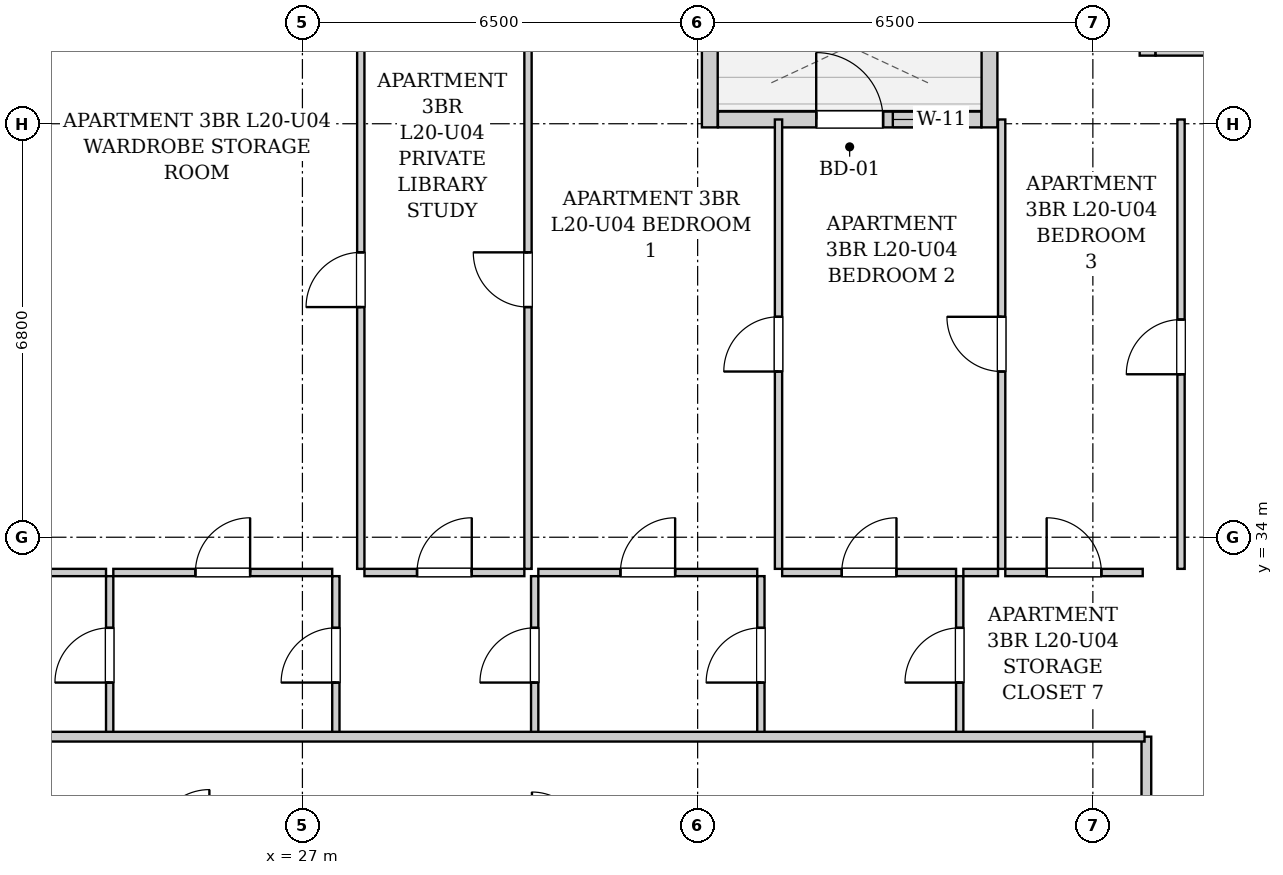
"""IFC4 building model, lengths in metres.
Left out: names, types, materials, properties, quantities, classifications, styles, units other than length and angle.
Written with IfcOpenShell. Run it as: python <this file> out.ifc"""

import sys

from ifc_helpers import new_model, si_unit, direction, frame, frame_2d, origin, place, context, subcontext, project, spatial, rectangle, extrude, element, fill, save


model = new_model("IFC4")
c1 = context("Model", 3, precision=1e-05, world=origin(), true_north=direction((0.0, 1.0)))
c2 = subcontext(c1, "Body", "Model", "MODEL_VIEW")
j1 = project(units=[si_unit("LENGTHUNIT", "METRE"), si_unit("PLANEANGLEUNIT", "RADIAN")], contexts=[c1])
p1 = place(None, origin())
s1 = spatial("IfcSite", under=j1, at=p1, CompositionType="ELEMENT")
p2 = place(p1, origin())
s2 = spatial("IfcBuilding", under=s1, at=p2, CompositionType="ELEMENT")
p3 = place(p2, frame((0.0, 0.0, 75.1)))
s3 = spatial("IfcBuildingStorey", under=s2, at=p3, CompositionType="ELEMENT", Elevation=75.1)
p4 = place(p3, frame((33.7, 43.14, 0.0), z_axis=(0.0, 0.0, 1.0), x_axis=(0.0, -1.0, 0.0)))
e1 = element("IfcWall", 1, at=p4, inside=s3, PredefinedType="SOLIDWALL", context=c2, shape_type="SweptSolid", body=[
    extrude(rectangle(XDim=2.4, YDim=0.26, at=frame_2d((1.2, 0.0))), origin(), (0.0, 0.0, 1.0), 2.94),
])
p5 = place(p3, frame((33.834, 40.87, 0.0), z_axis=(0.0, 0.0, 1.0), x_axis=(1.0, 0.0, 0.0)))
e2 = element("IfcWall", 2, at=p5, inside=s3, PredefinedType="SOLIDWALL", context=c2, shape_type="SweptSolid", body=[
    extrude(rectangle(XDim=4.332, YDim=0.26, at=frame_2d((2.166, 0.0))), origin(), (0.0, 0.0, 1.0), 2.94),
])
p6 = place(p5, frame((1.616, 0.0, 0.0)))
e3 = element("IfcOpeningElement", 3, at=p6, cuts=e2, PredefinedType="OPENING", context=c2, shape_type="SweptSolid", body=[
    extrude(rectangle(XDim=1.1, YDim=2.0, at=frame_2d((0.55, 1.0))), frame((0.0, 0.14, 0.0), z_axis=(0.0, -1.0, 0.0), x_axis=(1.0, 0.0, 0.0)), (0.0, 0.0, 1.0), 0.28),
])
p7 = place(p5, frame((2.876, 0.0, 0.55)))
e4 = element("IfcOpeningElement", 4, at=p7, cuts=e2, PredefinedType="OPENING", context=c2, shape_type="SweptSolid", body=[
    extrude(rectangle(XDim=0.85, YDim=1.2, at=frame_2d((0.425, 0.6))), frame((0.0, 0.14, 0.0), z_axis=(0.0, -1.0, 0.0), x_axis=(1.0, 0.0, 0.0)), (0.0, 0.0, 1.0), 0.28),
])
p8 = place(p3, frame((38.3, 40.74, 0.0), z_axis=(0.0, 0.0, 1.0), x_axis=(0.0, 1.0, 0.0)))
e5 = element("IfcWall", 5, at=p8, inside=s3, PredefinedType="SOLIDWALL", context=c2, shape_type="SweptSolid", body=[
    extrude(rectangle(XDim=2.4, YDim=0.26, at=frame_2d((1.2, 0.0))), origin(), (0.0, 0.0, 1.0), 2.94),
])
p9 = place(p3, frame((40.9, 42.998, 0.0), z_axis=(0.0, 0.0, 1.0), x_axis=(0.0, -1.0, 0.0)))
e6 = element("IfcWall", 6, at=p9, inside=s3, PredefinedType="SOLIDWALL", context=c2, shape_type="SweptSolid", body=[
    extrude(rectangle(XDim=1.078, YDim=0.26, at=frame_2d((0.539, 0.0))), origin(), (0.0, 0.0, 1.0), 2.94),
])
p10 = place(p3, frame((41.032, 42.05, 0.0), z_axis=(0.0, 0.0, 1.0), x_axis=(1.0, 0.0, 0.0)))
e7 = element("IfcWall", 7, at=p10, inside=s3, PredefinedType="SOLIDWALL", context=c2, shape_type="SweptSolid", body=[
    extrude(rectangle(XDim=1.248, YDim=0.26, at=frame_2d((0.624, 0.0))), origin(), (0.0, 0.0, 1.0), 2.94),
])
p11 = place(p3, frame((40.88, 28.98, 0.0), z_axis=(0.0, 0.0, 1.0), x_axis=(0.0, 1.0, 0.0)))
e8 = element("IfcWall", 8, at=p11, inside=s3, PredefinedType="PARTITIONING", context=c2, shape_type="SweptSolid", body=[
    extrude(rectangle(XDim=1.74, YDim=0.16, at=frame_2d((0.87, 0.0))), origin(), (0.0, 0.0, 1.0), 2.94),
])
p12 = place(p3, frame((23.83, 30.76, 0.0), z_axis=(0.0, 0.0, 1.0), x_axis=(0.0, 1.0, 0.0)))
e9 = element("IfcWall", 9, at=p12, inside=s3, PredefinedType="PARTITIONING", context=c2, shape_type="SweptSolid", body=[
    extrude(rectangle(XDim=2.6, YDim=0.12, at=frame_2d((1.3, 0.0))), origin(), (0.0, 0.0, 1.0), 2.94),
])
p13 = place(p12, frame((0.85, 0.0, 0.0)))
e10 = element("IfcOpeningElement", 10, at=p13, cuts=e9, PredefinedType="OPENING", context=c2, shape_type="SweptSolid", body=[
    extrude(rectangle(XDim=0.9, YDim=2.05, at=frame_2d((0.45, 1.025))), frame((0.0, 0.07, 0.0), z_axis=(0.0, -1.0, 0.0), x_axis=(1.0, 0.0, 0.0)), (0.0, 0.0, 1.0), 0.14),
])
p14 = place(p3, frame((22.7, 33.42, 0.0), z_axis=(0.0, 0.0, 1.0), x_axis=(1.0, 0.0, 0.0)))
e11 = element("IfcWall", 11, at=p14, inside=s3, PredefinedType="PARTITIONING", context=c2, shape_type="SweptSolid", body=[
    extrude(rectangle(XDim=1.07, YDim=0.12, at=frame_2d((0.535, 0.0))), origin(), (0.0, 0.0, 1.0), 2.94),
])
p15 = place(p3, frame((27.55, 30.76, 0.0), z_axis=(0.0, 0.0, 1.0), x_axis=(0.0, 1.0, 0.0)))
e12 = element("IfcWall", 12, at=p15, inside=s3, PredefinedType="PARTITIONING", context=c2, shape_type="SweptSolid", body=[
    extrude(rectangle(XDim=2.6, YDim=0.12, at=frame_2d((1.3, 0.0))), origin(), (0.0, 0.0, 1.0), 2.94),
])
p16 = place(p15, frame((0.85, 0.0, 0.0)))
e13 = element("IfcOpeningElement", 13, at=p16, cuts=e12, PredefinedType="OPENING", context=c2, shape_type="SweptSolid", body=[
    extrude(rectangle(XDim=0.9, YDim=2.05, at=frame_2d((0.45, 1.025))), frame((0.0, 0.07, 0.0), z_axis=(0.0, -1.0, 0.0), x_axis=(1.0, 0.0, 0.0)), (0.0, 0.0, 1.0), 0.14),
])
p17 = place(p3, frame((23.89, 33.42, 0.0), z_axis=(0.0, 0.0, 1.0), x_axis=(1.0, 0.0, 0.0)))
e14 = element("IfcWall", 14, at=p17, inside=s3, PredefinedType="PARTITIONING", context=c2, shape_type="SweptSolid", body=[
    extrude(rectangle(XDim=3.6, YDim=0.12, at=frame_2d((1.8, 0.0))), origin(), (0.0, 0.0, 1.0), 2.94),
])
p18 = place(p17, frame((1.35, 0.0, 0.0)))
e15 = element("IfcOpeningElement", 15, at=p18, cuts=e14, PredefinedType="OPENING", context=c2, shape_type="SweptSolid", body=[
    extrude(rectangle(XDim=0.9, YDim=2.05, at=frame_2d((0.45, 1.025))), frame((0.0, 0.07, 0.0), z_axis=(0.0, -1.0, 0.0), x_axis=(1.0, 0.0, 0.0)), (0.0, 0.0, 1.0), 0.14),
])
p19 = place(p3, frame((30.82, 30.76, 0.0), z_axis=(0.0, 0.0, 1.0), x_axis=(0.0, 1.0, 0.0)))
e16 = element("IfcWall", 16, at=p19, inside=s3, PredefinedType="PARTITIONING", context=c2, shape_type="SweptSolid", body=[
    extrude(rectangle(XDim=2.6, YDim=0.12, at=frame_2d((1.3, 0.0))), origin(), (0.0, 0.0, 1.0), 2.94),
])
p20 = place(p19, frame((0.85, 0.0, 0.0)))
e17 = element("IfcOpeningElement", 17, at=p20, cuts=e16, PredefinedType="OPENING", context=c2, shape_type="SweptSolid", body=[
    extrude(rectangle(XDim=0.9, YDim=2.05, at=frame_2d((0.45, 1.025))), frame((0.0, 0.07, 0.0), z_axis=(0.0, -1.0, 0.0), x_axis=(1.0, 0.0, 0.0)), (0.0, 0.0, 1.0), 0.14),
])
p21 = place(p3, frame((28.02, 33.42, 0.0), z_axis=(0.0, 0.0, 1.0), x_axis=(1.0, 0.0, 0.0)))
e18 = element("IfcWall", 18, at=p21, inside=s3, PredefinedType="PARTITIONING", context=c2, shape_type="SweptSolid", body=[
    extrude(rectangle(XDim=2.63, YDim=0.12, at=frame_2d((1.315, 0.0))), origin(), (0.0, 0.0, 1.0), 2.94),
])
p22 = place(p21, frame((0.865, 0.0, 0.0)))
e19 = element("IfcOpeningElement", 19, at=p22, cuts=e18, PredefinedType="OPENING", context=c2, shape_type="SweptSolid", body=[
    extrude(rectangle(XDim=0.9, YDim=2.05, at=frame_2d((0.45, 1.025))), frame((0.0, 0.07, 0.0), z_axis=(0.0, -1.0, 0.0), x_axis=(1.0, 0.0, 0.0)), (0.0, 0.0, 1.0), 0.14),
])
p23 = place(p3, frame((34.54, 30.76, 0.0), z_axis=(0.0, 0.0, 1.0), x_axis=(0.0, 1.0, 0.0)))
e20 = element("IfcWall", 20, at=p23, inside=s3, PredefinedType="PARTITIONING", context=c2, shape_type="SweptSolid", body=[
    extrude(rectangle(XDim=2.6, YDim=0.12, at=frame_2d((1.3, 0.0))), origin(), (0.0, 0.0, 1.0), 2.94),
])
p24 = place(p23, frame((0.85, 0.0, 0.0)))
e21 = element("IfcOpeningElement", 21, at=p24, cuts=e20, PredefinedType="OPENING", context=c2, shape_type="SweptSolid", body=[
    extrude(rectangle(XDim=0.9, YDim=2.05, at=frame_2d((0.45, 1.025))), frame((0.0, 0.07, 0.0), z_axis=(0.0, -1.0, 0.0), x_axis=(1.0, 0.0, 0.0)), (0.0, 0.0, 1.0), 0.14),
])
p25 = place(p3, frame((30.88, 33.42, 0.0), z_axis=(0.0, 0.0, 1.0), x_axis=(1.0, 0.0, 0.0)))
e22 = element("IfcWall", 22, at=p25, inside=s3, PredefinedType="PARTITIONING", context=c2, shape_type="SweptSolid", body=[
    extrude(rectangle(XDim=3.6, YDim=0.12, at=frame_2d((1.8, 0.0))), origin(), (0.0, 0.0, 1.0), 2.94),
])
p26 = place(p25, frame((1.35, 0.0, 0.0)))
e23 = element("IfcOpeningElement", 23, at=p26, cuts=e22, PredefinedType="OPENING", context=c2, shape_type="SweptSolid", body=[
    extrude(rectangle(XDim=0.9, YDim=2.05, at=frame_2d((0.45, 1.025))), frame((0.0, 0.07, 0.0), z_axis=(0.0, -1.0, 0.0), x_axis=(1.0, 0.0, 0.0)), (0.0, 0.0, 1.0), 0.14),
])
p27 = place(p3, frame((37.81, 30.76, 0.0), z_axis=(0.0, 0.0, 1.0), x_axis=(0.0, 1.0, 0.0)))
e24 = element("IfcWall", 24, at=p27, inside=s3, PredefinedType="PARTITIONING", context=c2, shape_type="SweptSolid", body=[
    extrude(rectangle(XDim=2.6, YDim=0.12, at=frame_2d((1.3, 0.0))), origin(), (0.0, 0.0, 1.0), 2.94),
])
p28 = place(p27, frame((0.85, 0.0, 0.0)))
e25 = element("IfcOpeningElement", 25, at=p28, cuts=e24, PredefinedType="OPENING", context=c2, shape_type="SweptSolid", body=[
    extrude(rectangle(XDim=0.9, YDim=2.05, at=frame_2d((0.45, 1.025))), frame((0.0, 0.07, 0.0), z_axis=(0.0, -1.0, 0.0), x_axis=(1.0, 0.0, 0.0)), (0.0, 0.0, 1.0), 0.14),
])
p29 = place(p3, frame((34.89, 33.42, 0.0), z_axis=(0.0, 0.0, 1.0), x_axis=(1.0, 0.0, 0.0)))
e26 = element("IfcWall", 26, at=p29, inside=s3, PredefinedType="PARTITIONING", context=c2, shape_type="SweptSolid", body=[
    extrude(rectangle(XDim=2.86, YDim=0.12, at=frame_2d((1.43, 0.0))), origin(), (0.0, 0.0, 1.0), 2.94),
])
p30 = place(p29, frame((0.98, 0.0, 0.0)))
e27 = element("IfcOpeningElement", 27, at=p30, cuts=e26, PredefinedType="OPENING", context=c2, shape_type="SweptSolid", body=[
    extrude(rectangle(XDim=0.9, YDim=2.05, at=frame_2d((0.45, 1.025))), frame((0.0, 0.07, 0.0), z_axis=(0.0, -1.0, 0.0), x_axis=(1.0, 0.0, 0.0)), (0.0, 0.0, 1.0), 0.14),
])
p31 = place(p3, frame((37.87, 33.42, 0.0), z_axis=(0.0, 0.0, 1.0), x_axis=(1.0, 0.0, 0.0)))
e28 = element("IfcWall", 28, at=p31, inside=s3, PredefinedType="PARTITIONING", context=c2, shape_type="SweptSolid", body=[
    extrude(rectangle(XDim=0.57, YDim=0.12, at=frame_2d((0.285, 0.0))), origin(), (0.0, 0.0, 1.0), 2.94),
])
p32 = place(p3, frame((38.56, 33.42, 0.0), z_axis=(0.0, 0.0, 1.0), x_axis=(1.0, 0.0, 0.0)))
e29 = element("IfcWall", 29, at=p32, inside=s3, PredefinedType="PARTITIONING", context=c2, shape_type="SweptSolid", body=[
    extrude(rectangle(XDim=2.26, YDim=0.12, at=frame_2d((1.13, 0.0))), origin(), (0.0, 0.0, 1.0), 2.94),
])
p33 = place(p32, frame((0.68, 0.0, 0.0)))
e30 = element("IfcOpeningElement", 30, at=p33, cuts=e29, PredefinedType="OPENING", context=c2, shape_type="SweptSolid", body=[
    extrude(rectangle(XDim=0.9, YDim=2.05, at=frame_2d((0.45, 1.025))), frame((0.0, 0.07, 0.0), z_axis=(0.0, -1.0, 0.0), x_axis=(1.0, 0.0, 0.0)), (0.0, 0.0, 1.0), 0.14),
])
p34 = place(p3, frame((27.96, 33.48, 0.0), z_axis=(0.0, 0.0, 1.0), x_axis=(0.0, 1.0, 0.0)))
e31 = element("IfcWall", 31, at=p34, inside=s3, PredefinedType="PARTITIONING", context=c2, shape_type="SweptSolid", body=[
    extrude(rectangle(XDim=9.54, YDim=0.12, at=frame_2d((4.77, 0.0))), origin(), (0.0, 0.0, 1.0), 2.94),
])
p35 = place(p34, frame((4.305, 0.0, 0.0)))
e32 = element("IfcOpeningElement", 32, at=p35, cuts=e31, PredefinedType="OPENING", context=c2, shape_type="SweptSolid", body=[
    extrude(rectangle(XDim=0.9, YDim=2.05, at=frame_2d((0.45, 1.025))), frame((0.0, 0.07, 0.0), z_axis=(0.0, -1.0, 0.0), x_axis=(1.0, 0.0, 0.0)), (0.0, 0.0, 1.0), 0.14),
])
p36 = place(p3, frame((30.71, 33.48, 0.0), z_axis=(0.0, 0.0, 1.0), x_axis=(0.0, 1.0, 0.0)))
e33 = element("IfcWall", 33, at=p36, inside=s3, PredefinedType="PARTITIONING", context=c2, shape_type="SweptSolid", body=[
    extrude(rectangle(XDim=9.54, YDim=0.12, at=frame_2d((4.77, 0.0))), origin(), (0.0, 0.0, 1.0), 2.94),
])
p37 = place(p36, frame((4.305, 0.0, 0.0)))
e34 = element("IfcOpeningElement", 34, at=p37, cuts=e33, PredefinedType="OPENING", context=c2, shape_type="SweptSolid", body=[
    extrude(rectangle(XDim=0.9, YDim=2.05, at=frame_2d((0.45, 1.025))), frame((0.0, 0.07, 0.0), z_axis=(0.0, -1.0, 0.0), x_axis=(1.0, 0.0, 0.0)), (0.0, 0.0, 1.0), 0.14),
])
p38 = place(p3, frame((34.83, 33.48, 0.0), z_axis=(0.0, 0.0, 1.0), x_axis=(0.0, 1.0, 0.0)))
e35 = element("IfcWall", 35, at=p38, inside=s3, PredefinedType="PARTITIONING", context=c2, shape_type="SweptSolid", body=[
    extrude(rectangle(XDim=7.39, YDim=0.12, at=frame_2d((3.695, 0.0))), origin(), (0.0, 0.0, 1.0), 2.94),
])
p39 = place(p38, frame((3.245, 0.0, 0.0)))
e36 = element("IfcOpeningElement", 36, at=p39, cuts=e35, PredefinedType="OPENING", context=c2, shape_type="SweptSolid", body=[
    extrude(rectangle(XDim=0.9, YDim=2.05, at=frame_2d((0.45, 1.025))), frame((0.0, 0.07, 0.0), z_axis=(0.0, -1.0, 0.0), x_axis=(1.0, 0.0, 0.0)), (0.0, 0.0, 1.0), 0.14),
])
p40 = place(p3, frame((38.5, 33.48, 0.0), z_axis=(0.0, 0.0, 1.0), x_axis=(0.0, 1.0, 0.0)))
e37 = element("IfcWall", 37, at=p40, inside=s3, PredefinedType="PARTITIONING", context=c2, shape_type="SweptSolid", body=[
    extrude(rectangle(XDim=7.39, YDim=0.12, at=frame_2d((3.695, 0.0))), origin(), (0.0, 0.0, 1.0), 2.94),
])
p41 = place(p40, frame((3.245, 0.0, 0.0)))
e38 = element("IfcOpeningElement", 38, at=p41, cuts=e37, PredefinedType="OPENING", context=c2, shape_type="SweptSolid", body=[
    extrude(rectangle(XDim=0.9, YDim=2.05, at=frame_2d((0.45, 1.025))), frame((0.0, 0.07, 0.0), z_axis=(0.0, -1.0, 0.0), x_axis=(1.0, 0.0, 0.0)), (0.0, 0.0, 1.0), 0.14),
])
p42 = place(p3, frame((41.45, 33.48, 0.0), z_axis=(0.0, 0.0, 1.0), x_axis=(0.0, 1.0, 0.0)))
e39 = element("IfcWall", 39, at=p42, inside=s3, PredefinedType="PARTITIONING", context=c2, shape_type="SweptSolid", body=[
    extrude(rectangle(XDim=7.39, YDim=0.12, at=frame_2d((3.695, 0.0))), origin(), (0.0, 0.0, 1.0), 2.94),
])
p43 = place(p42, frame((3.2, 0.0, 0.0)))
e40 = element("IfcOpeningElement", 40, at=p43, cuts=e39, PredefinedType="OPENING", context=c2, shape_type="SweptSolid", body=[
    extrude(rectangle(XDim=0.9, YDim=2.05, at=frame_2d((0.45, 1.025))), frame((0.0, 0.07, 0.0), z_axis=(0.0, -1.0, 0.0), x_axis=(1.0, 0.0, 0.0)), (0.0, 0.0, 1.0), 0.14),
])
p44 = place(p3, frame((10.05, 30.72, 0.0), z_axis=(0.0, 0.0, 1.0), x_axis=(1.0, 0.0, 0.0)))
e41 = element("IfcWall", 41, at=p44, inside=s3, PredefinedType="PARTITIONING", context=c2, shape_type="SweptSolid", body=[
    extrude(rectangle(XDim=30.8, YDim=0.16, at=frame_2d((15.4, 0.0))), origin(), (0.0, 0.0, 1.0), 2.94),
])
p45 = place(p44, frame((4.165, 0.0, 0.0)))
e42 = element("IfcOpeningElement", 42, at=p45, cuts=e41, PredefinedType="OPENING", context=c2, shape_type="SweptSolid", body=[
    extrude(rectangle(XDim=0.95, YDim=2.1, at=frame_2d((0.475, 1.05))), frame((0.0, 0.09, 0.0), z_axis=(0.0, -1.0, 0.0), x_axis=(1.0, 0.0, 0.0)), (0.0, 0.0, 1.0), 0.18),
])
p46 = place(p13, origin())
e43 = element("IfcDoor", 43, at=p46, inside=s3, OperationType="SINGLE_SWING_LEFT", PredefinedType="DOOR", context=c2, shape_type="SweptSolid", body=[
    extrude(rectangle(XDim=0.9, YDim=2.05, at=frame_2d((0.45, 1.025))), frame((0.0, 0.025, 0.0), z_axis=(0.0, -1.0, 0.0), x_axis=(1.0, 0.0, 0.0)), (0.0, 0.0, 1.0), 0.05),
])
fill(e10, e43)
p47 = place(p16, origin())
e44 = element("IfcDoor", 44, at=p47, inside=s3, OperationType="SINGLE_SWING_LEFT", PredefinedType="DOOR", context=c2, shape_type="SweptSolid", body=[
    extrude(rectangle(XDim=0.9, YDim=2.05, at=frame_2d((0.45, 1.025))), frame((0.0, 0.025, 0.0), z_axis=(0.0, -1.0, 0.0), x_axis=(1.0, 0.0, 0.0)), (0.0, 0.0, 1.0), 0.05),
])
fill(e13, e44)
p48 = place(p18, origin())
e45 = element("IfcDoor", 45, at=p48, inside=s3, OperationType="SINGLE_SWING_RIGHT", PredefinedType="DOOR", context=c2, shape_type="SweptSolid", body=[
    extrude(rectangle(XDim=0.9, YDim=2.05, at=frame_2d((0.45, 1.025))), frame((0.0, 0.025, 0.0), z_axis=(0.0, -1.0, 0.0), x_axis=(1.0, 0.0, 0.0)), (0.0, 0.0, 1.0), 0.05),
])
fill(e15, e45)
p49 = place(p20, origin())
e46 = element("IfcDoor", 46, at=p49, inside=s3, OperationType="SINGLE_SWING_LEFT", PredefinedType="DOOR", context=c2, shape_type="SweptSolid", body=[
    extrude(rectangle(XDim=0.9, YDim=2.05, at=frame_2d((0.45, 1.025))), frame((0.0, 0.025, 0.0), z_axis=(0.0, -1.0, 0.0), x_axis=(1.0, 0.0, 0.0)), (0.0, 0.0, 1.0), 0.05),
])
fill(e17, e46)
p50 = place(p22, origin())
e47 = element("IfcDoor", 47, at=p50, inside=s3, OperationType="SINGLE_SWING_RIGHT", PredefinedType="DOOR", context=c2, shape_type="SweptSolid", body=[
    extrude(rectangle(XDim=0.9, YDim=2.05, at=frame_2d((0.45, 1.025))), frame((0.0, 0.025, 0.0), z_axis=(0.0, -1.0, 0.0), x_axis=(1.0, 0.0, 0.0)), (0.0, 0.0, 1.0), 0.05),
])
fill(e19, e47)
p51 = place(p24, origin())
e48 = element("IfcDoor", 48, at=p51, inside=s3, OperationType="SINGLE_SWING_LEFT", PredefinedType="DOOR", context=c2, shape_type="SweptSolid", body=[
    extrude(rectangle(XDim=0.9, YDim=2.05, at=frame_2d((0.45, 1.025))), frame((0.0, 0.025, 0.0), z_axis=(0.0, -1.0, 0.0), x_axis=(1.0, 0.0, 0.0)), (0.0, 0.0, 1.0), 0.05),
])
fill(e21, e48)
p52 = place(p26, origin())
e49 = element("IfcDoor", 49, at=p52, inside=s3, OperationType="SINGLE_SWING_RIGHT", PredefinedType="DOOR", context=c2, shape_type="SweptSolid", body=[
    extrude(rectangle(XDim=0.9, YDim=2.05, at=frame_2d((0.45, 1.025))), frame((0.0, 0.025, 0.0), z_axis=(0.0, -1.0, 0.0), x_axis=(1.0, 0.0, 0.0)), (0.0, 0.0, 1.0), 0.05),
])
fill(e23, e49)
p53 = place(p28, origin())
e50 = element("IfcDoor", 50, at=p53, inside=s3, OperationType="SINGLE_SWING_LEFT", PredefinedType="DOOR", context=c2, shape_type="SweptSolid", body=[
    extrude(rectangle(XDim=0.9, YDim=2.05, at=frame_2d((0.45, 1.025))), frame((0.0, 0.025, 0.0), z_axis=(0.0, -1.0, 0.0), x_axis=(1.0, 0.0, 0.0)), (0.0, 0.0, 1.0), 0.05),
])
fill(e25, e50)
p54 = place(p30, origin())
e51 = element("IfcDoor", 51, at=p54, inside=s3, OperationType="SINGLE_SWING_RIGHT", PredefinedType="DOOR", context=c2, shape_type="SweptSolid", body=[
    extrude(rectangle(XDim=0.9, YDim=2.05, at=frame_2d((0.45, 1.025))), frame((0.0, 0.025, 0.0), z_axis=(0.0, -1.0, 0.0), x_axis=(1.0, 0.0, 0.0)), (0.0, 0.0, 1.0), 0.05),
])
fill(e27, e51)
p55 = place(p33, origin())
e52 = element("IfcDoor", 52, at=p55, inside=s3, OperationType="SINGLE_SWING_LEFT", PredefinedType="DOOR", context=c2, shape_type="SweptSolid", body=[
    extrude(rectangle(XDim=0.9, YDim=2.05, at=frame_2d((0.45, 1.025))), frame((0.0, 0.025, 0.0), z_axis=(0.0, -1.0, 0.0), x_axis=(1.0, 0.0, 0.0)), (0.0, 0.0, 1.0), 0.05),
])
fill(e30, e52)
p56 = place(p35, origin())
e53 = element("IfcDoor", 53, at=p56, inside=s3, OperationType="SINGLE_SWING_LEFT", PredefinedType="DOOR", context=c2, shape_type="SweptSolid", body=[
    extrude(rectangle(XDim=0.9, YDim=2.05, at=frame_2d((0.45, 1.025))), frame((0.0, 0.025, 0.0), z_axis=(0.0, -1.0, 0.0), x_axis=(1.0, 0.0, 0.0)), (0.0, 0.0, 1.0), 0.05),
])
fill(e32, e53)
p57 = place(p37, origin())
e54 = element("IfcDoor", 54, at=p57, inside=s3, OperationType="SINGLE_SWING_RIGHT", PredefinedType="DOOR", context=c2, shape_type="SweptSolid", body=[
    extrude(rectangle(XDim=0.9, YDim=2.05, at=frame_2d((0.45, 1.025))), frame((0.0, 0.025, 0.0), z_axis=(0.0, -1.0, 0.0), x_axis=(1.0, 0.0, 0.0)), (0.0, 0.0, 1.0), 0.05),
])
fill(e34, e54)
p58 = place(p39, origin())
e55 = element("IfcDoor", 55, at=p58, inside=s3, OperationType="SINGLE_SWING_LEFT", PredefinedType="DOOR", context=c2, shape_type="SweptSolid", body=[
    extrude(rectangle(XDim=0.9, YDim=2.05, at=frame_2d((0.45, 1.025))), frame((0.0, 0.025, 0.0), z_axis=(0.0, -1.0, 0.0), x_axis=(1.0, 0.0, 0.0)), (0.0, 0.0, 1.0), 0.05),
])
fill(e36, e55)
p59 = place(p41, origin())
e56 = element("IfcDoor", 56, at=p59, inside=s3, OperationType="SINGLE_SWING_RIGHT", PredefinedType="DOOR", context=c2, shape_type="SweptSolid", body=[
    extrude(rectangle(XDim=0.9, YDim=2.05, at=frame_2d((0.45, 1.025))), frame((0.0, 0.025, 0.0), z_axis=(0.0, -1.0, 0.0), x_axis=(1.0, 0.0, 0.0)), (0.0, 0.0, 1.0), 0.05),
])
fill(e38, e56)
p60 = place(p43, origin())
e57 = element("IfcDoor", 57, at=p60, inside=s3, OperationType="SINGLE_SWING_LEFT", PredefinedType="DOOR", context=c2, shape_type="SweptSolid", body=[
    extrude(rectangle(XDim=0.9, YDim=2.05, at=frame_2d((0.45, 1.025))), frame((0.0, 0.025, 0.0), z_axis=(0.0, -1.0, 0.0), x_axis=(1.0, 0.0, 0.0)), (0.0, 0.0, 1.0), 0.05),
])
fill(e40, e57)
p61 = place(p6, origin())
e58 = element("IfcDoor", 58, at=p61, inside=s3, OperationType="SINGLE_SWING_LEFT", PredefinedType="DOOR", context=c2, shape_type="SweptSolid", body=[
    extrude(rectangle(XDim=1.1, YDim=2.0, at=frame_2d((0.55, 1.0))), frame((0.0, 0.025, 0.0), z_axis=(0.0, -1.0, 0.0), x_axis=(1.0, 0.0, 0.0)), (0.0, 0.0, 1.0), 0.05),
])
fill(e3, e58)
p62 = place(p7, origin())
e59 = element("IfcWindow", 59, at=p62, inside=s3, PartitioningType="SINGLE_PANEL", PredefinedType="WINDOW", context=c2, shape_type="SweptSolid", body=[
    extrude(rectangle(XDim=0.85, YDim=1.2, at=frame_2d((0.425, 0.6))), frame((0.0, 0.03, 0.0), z_axis=(0.0, -1.0, 0.0), x_axis=(1.0, 0.0, 0.0)), (0.0, 0.0, 1.0), 0.06),
])
fill(e4, e59)
save(model, sys.argv[1])
